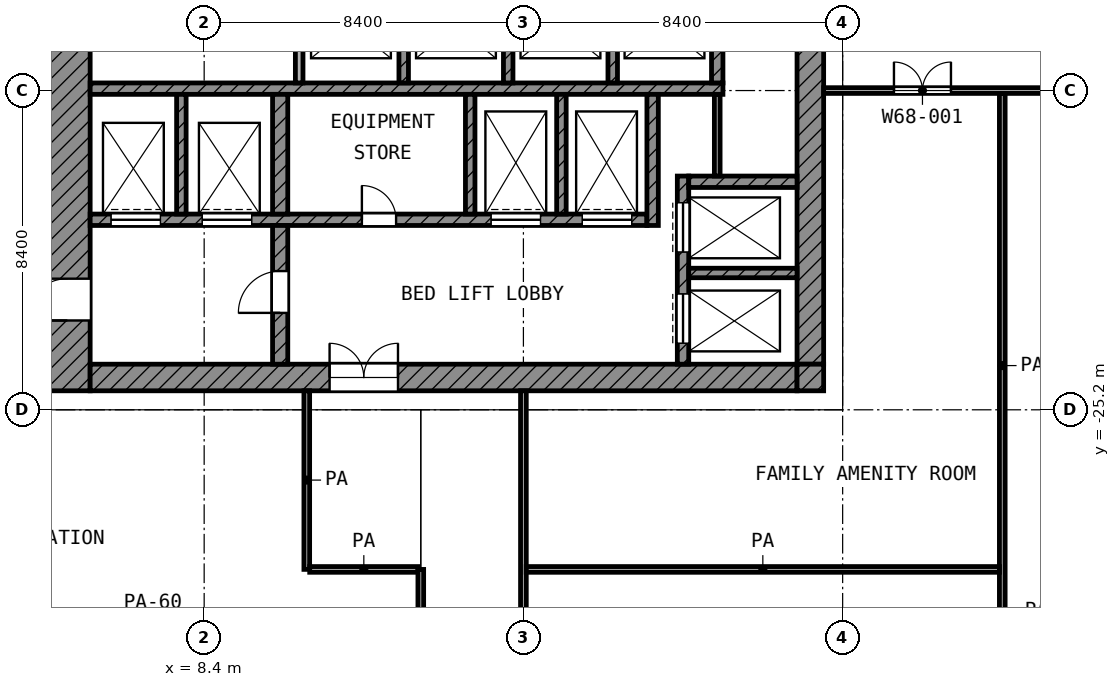
"""IFC4 building model, lengths in metres.
Left out: names, types, materials, properties, quantities, classifications, styles, units other than length and angle.
Written with IfcOpenShell. Run it as: python <this file> out.ifc"""

import sys

from ifc_helpers import new_model, si_unit, direction, frame, frame_2d, origin, place, context, subcontext, project, spatial, rectangle, extrude, element, fill, save


model = new_model("IFC4")
c1 = context("Model", 3, precision=1e-05, world=origin(), true_north=direction((0.0, 1.0)))
c2 = subcontext(c1, "Body", "Model", "MODEL_VIEW")
j1 = project(units=[si_unit("LENGTHUNIT", "METRE"), si_unit("PLANEANGLEUNIT", "RADIAN")], contexts=[c1])
p1 = place(None, origin())
s1 = spatial("IfcSite", under=j1, at=p1, CompositionType="ELEMENT")
p2 = place(p1, origin())
s2 = spatial("IfcBuilding", under=s1, at=p2, CompositionType="ELEMENT")
p3 = place(p2, frame((0.0, 0.0, 315.4)))
s3 = spatial("IfcBuildingStorey", under=s2, at=p3, CompositionType="ELEMENT", Elevation=315.4)
p4 = place(p3, frame((4.8, -24.7, 0.0), z_axis=(0.0, 0.0, 1.0), x_axis=(0.0, 1.0, 0.0)))
e1 = element("IfcWall", 1, at=p4, inside=s3, PredefinedType="SHEAR", context=c2, shape_type="SweptSolid", body=[
    extrude(rectangle(XDim=19.3, YDim=1.2, at=frame_2d((9.65, 0.0))), origin(), (0.0, 0.0, 1.0), 3.6),
])
p5 = place(p4, frame((11.15, 0.0, 0.0)))
e2 = element("IfcOpeningElement", 2, at=p5, cuts=e1, PredefinedType="OPENING", context=c2, shape_type="SweptSolid", body=[
    extrude(rectangle(XDim=1.1, YDim=2.1, at=frame_2d((0.55, 1.05))), frame((0.0, 0.61, 0.0), z_axis=(0.0, -1.0, 0.0), x_axis=(1.0, 0.0, 0.0)), (0.0, 0.0, 1.0), 1.22),
])
p6 = place(p4, frame((1.85, 0.0, 0.0)))
e3 = element("IfcOpeningElement", 3, at=p6, cuts=e1, PredefinedType="OPENING", context=c2, shape_type="SweptSolid", body=[
    extrude(rectangle(XDim=1.1, YDim=2.1, at=frame_2d((0.55, 1.05))), frame((0.0, 0.61, 0.0), z_axis=(0.0, -1.0, 0.0), x_axis=(1.0, 0.0, 0.0)), (0.0, 0.0, 1.0), 1.22),
])
p7 = place(p3, frame((24.35, -24.0, 0.0), z_axis=(0.0, 0.0, 1.0), x_axis=(0.0, 1.0, 0.0)))
e4 = element("IfcWall", 4, at=p7, inside=s3, PredefinedType="SHEAR", context=c2, shape_type="SweptSolid", body=[
    extrude(rectangle(XDim=18.6, YDim=0.7, at=frame_2d((9.3, 0.0))), origin(), (0.0, 0.0, 1.0), 3.6),
])
p8 = place(p7, frame((10.5, 0.0, 0.0)))
e5 = element("IfcOpeningElement", 5, at=p8, cuts=e4, PredefinedType="OPENING", context=c2, shape_type="SweptSolid", body=[
    extrude(rectangle(XDim=1.8, YDim=2.1, at=frame_2d((0.9, 1.05))), frame((0.0, 0.36, 0.0), z_axis=(0.0, -1.0, 0.0), x_axis=(1.0, 0.0, 0.0)), (0.0, 0.0, 1.0), 0.72),
])
p9 = place(p3, frame((5.4, -24.35, 0.0), z_axis=(0.0, 0.0, 1.0), x_axis=(1.0, 0.0, 0.0)))
e6 = element("IfcWall", 6, at=p9, inside=s3, PredefinedType="SHEAR", context=c2, shape_type="SweptSolid", body=[
    extrude(rectangle(XDim=18.6, YDim=0.7, at=frame_2d((9.3, 0.0))), origin(), (0.0, 0.0, 1.0), 3.6),
])
p10 = place(p9, frame((6.3, 0.0, 0.0)))
e7 = element("IfcOpeningElement", 7, at=p10, cuts=e6, PredefinedType="OPENING", context=c2, shape_type="SweptSolid", body=[
    extrude(rectangle(XDim=1.8, YDim=2.1, at=frame_2d((0.9, 1.05))), frame((0.0, 0.36, 0.0), z_axis=(0.0, -1.0, 0.0), x_axis=(1.0, 0.0, 0.0)), (0.0, 0.0, 1.0), 0.72),
])
p11 = place(p3, frame((24.35, -24.7, 0.0), z_axis=(0.0, 0.0, 1.0), x_axis=(0.0, 1.0, 0.0)))
e8 = element("IfcWall", 8, at=p11, inside=s3, PredefinedType="SHEAR", context=c2, shape_type="SweptSolid", body=[
    extrude(rectangle(XDim=0.7, YDim=0.7, at=frame_2d((0.35, 0.0))), origin(), (0.0, 0.0, 1.0), 3.6),
])
p12 = place(p3, frame((5.4, -16.75, 0.0), z_axis=(0.0, 0.0, 1.0), x_axis=(1.0, 0.0, 0.0)))
e9 = element("IfcWall", 9, at=p12, inside=s3, PredefinedType="SHEAR", context=c2, shape_type="SweptSolid", body=[
    extrude(rectangle(XDim=16.65, YDim=0.3, at=frame_2d((8.325, 0.0))), origin(), (0.0, 0.0, 1.0), 3.6),
])
p13 = place(p3, frame((5.4, -20.2, 0.0), z_axis=(0.0, 0.0, 1.0), x_axis=(1.0, 0.0, 0.0)))
e10 = element("IfcWall", 10, at=p13, inside=s3, PredefinedType="SHEAR", context=c2, shape_type="SweptSolid", body=[
    extrude(rectangle(XDim=14.65, YDim=0.3, at=frame_2d((7.325, 0.0))), origin(), (0.0, 0.0, 1.0), 3.6),
])
p14 = place(p13, frame((10.55, 0.0, 0.0)))
e11 = element("IfcOpeningElement", 11, at=p14, cuts=e10, PredefinedType="OPENING", context=c2, shape_type="SweptSolid", body=[
    extrude(rectangle(XDim=1.3, YDim=2.1, at=frame_2d((0.65, 1.05))), frame((0.0, 0.16, 0.0), z_axis=(0.0, -1.0, 0.0), x_axis=(1.0, 0.0, 0.0)), (0.0, 0.0, 1.0), 0.32),
])
p15 = place(p13, frame((12.95, 0.0, 0.0)))
e12 = element("IfcOpeningElement", 12, at=p15, cuts=e10, PredefinedType="OPENING", context=c2, shape_type="SweptSolid", body=[
    extrude(rectangle(XDim=1.3, YDim=2.1, at=frame_2d((0.65, 1.05))), frame((0.0, 0.16, 0.0), z_axis=(0.0, -1.0, 0.0), x_axis=(1.0, 0.0, 0.0)), (0.0, 0.0, 1.0), 0.32),
])
p16 = place(p13, frame((0.55, 0.0, 0.0)))
e13 = element("IfcOpeningElement", 13, at=p16, cuts=e10, PredefinedType="OPENING", context=c2, shape_type="SweptSolid", body=[
    extrude(rectangle(XDim=1.3, YDim=2.1, at=frame_2d((0.65, 1.05))), frame((0.0, 0.16, 0.0), z_axis=(0.0, -1.0, 0.0), x_axis=(1.0, 0.0, 0.0)), (0.0, 0.0, 1.0), 0.32),
])
p17 = place(p13, frame((2.95, 0.0, 0.0)))
e14 = element("IfcOpeningElement", 14, at=p17, cuts=e10, PredefinedType="OPENING", context=c2, shape_type="SweptSolid", body=[
    extrude(rectangle(XDim=1.3, YDim=2.1, at=frame_2d((0.65, 1.05))), frame((0.0, 0.16, 0.0), z_axis=(0.0, -1.0, 0.0), x_axis=(1.0, 0.0, 0.0)), (0.0, 0.0, 1.0), 0.32),
])
p18 = place(p13, frame((7.15, 0.0, 0.0)))
e15 = element("IfcOpeningElement", 15, at=p18, cuts=e10, PredefinedType="OPENING", context=c2, shape_type="SweptSolid", body=[
    extrude(rectangle(XDim=0.9, YDim=2.1, at=frame_2d((0.45, 1.05))), frame((0.0, 0.16, 0.0), z_axis=(0.0, -1.0, 0.0), x_axis=(1.0, 0.0, 0.0)), (0.0, 0.0, 1.0), 0.32),
])
p19 = place(p3, frame((10.4, -24.0, 0.0), z_axis=(0.0, 0.0, 1.0), x_axis=(0.0, 1.0, 0.0)))
e16 = element("IfcWall", 16, at=p19, inside=s3, PredefinedType="SHEAR", context=c2, shape_type="SweptSolid", body=[
    extrude(rectangle(XDim=3.65, YDim=0.4, at=frame_2d((1.825, 0.0))), origin(), (0.0, 0.0, 1.0), 3.6),
])
p20 = place(p19, frame((1.35, 0.0, 0.0)))
e17 = element("IfcOpeningElement", 17, at=p20, cuts=e16, PredefinedType="OPENING", context=c2, shape_type="SweptSolid", body=[
    extrude(rectangle(XDim=1.1, YDim=2.1, at=frame_2d((0.55, 1.05))), frame((0.0, 0.21, 0.0), z_axis=(0.0, -1.0, 0.0), x_axis=(1.0, 0.0, 0.0)), (0.0, 0.0, 1.0), 0.42),
])
p21 = place(p3, frame((10.4, -20.05, 0.0), z_axis=(0.0, 0.0, 1.0), x_axis=(0.0, 1.0, 0.0)))
e18 = element("IfcWall", 18, at=p21, inside=s3, PredefinedType="SHEAR", context=c2, shape_type="SweptSolid", body=[
    extrude(rectangle(XDim=3.15, YDim=0.4, at=frame_2d((1.575, 0.0))), origin(), (0.0, 0.0, 1.0), 3.6),
])
p22 = place(p3, frame((20.2, -20.35, 0.0), z_axis=(0.0, 0.0, 1.0), x_axis=(0.0, 1.0, 0.0)))
e19 = element("IfcWall", 19, at=p22, inside=s3, PredefinedType="SHEAR", context=c2, shape_type="SweptSolid", body=[
    extrude(rectangle(XDim=3.45, YDim=0.3, at=frame_2d((1.725, 0.0))), origin(), (0.0, 0.0, 1.0), 3.6),
])
p23 = place(p3, frame((21.9, -16.6, 0.0), z_axis=(0.0, 0.0, 1.0), x_axis=(0.0, 1.0, 0.0)))
e20 = element("IfcWall", 20, at=p23, inside=s3, PredefinedType="SHEAR", context=c2, shape_type="SweptSolid", body=[
    extrude(rectangle(XDim=2.35, YDim=0.3, at=frame_2d((1.175, 0.0))), origin(), (0.0, 0.0, 1.0), 3.6),
])
p24 = place(p3, frame((21.15, -19.2, 0.0), z_axis=(0.0, 0.0, 1.0), x_axis=(1.0, 0.0, 0.0)))
e21 = element("IfcWall", 21, at=p24, inside=s3, PredefinedType="SHEAR", context=c2, shape_type="SweptSolid", body=[
    extrude(rectangle(XDim=2.85, YDim=0.3, at=frame_2d((1.425, 0.0))), origin(), (0.0, 0.0, 1.0), 3.6),
])
p25 = place(p3, frame((21.0, -24.0, 0.0), z_axis=(0.0, 0.0, 1.0), x_axis=(0.0, 1.0, 0.0)))
e22 = element("IfcWall", 22, at=p25, inside=s3, PredefinedType="SHEAR", context=c2, shape_type="SweptSolid", body=[
    extrude(rectangle(XDim=4.95, YDim=0.3, at=frame_2d((2.475, 0.0))), origin(), (0.0, 0.0, 1.0), 3.6),
])
p26 = place(p25, frame((2.95, 0.0, 0.0)))
e23 = element("IfcOpeningElement", 23, at=p26, cuts=e22, PredefinedType="OPENING", context=c2, shape_type="SweptSolid", body=[
    extrude(rectangle(XDim=1.3, YDim=2.1, at=frame_2d((0.65, 1.05))), frame((0.0, 0.16, 0.0), z_axis=(0.0, -1.0, 0.0), x_axis=(1.0, 0.0, 0.0)), (0.0, 0.0, 1.0), 0.32),
])
p27 = place(p25, frame((0.55, 0.0, 0.0)))
e24 = element("IfcOpeningElement", 24, at=p27, cuts=e22, PredefinedType="OPENING", context=c2, shape_type="SweptSolid", body=[
    extrude(rectangle(XDim=1.3, YDim=2.1, at=frame_2d((0.65, 1.05))), frame((0.0, 0.16, 0.0), z_axis=(0.0, -1.0, 0.0), x_axis=(1.0, 0.0, 0.0)), (0.0, 0.0, 1.0), 0.32),
])
p28 = place(p3, frame((21.15, -21.6, 0.0), z_axis=(0.0, 0.0, 1.0), x_axis=(1.0, 0.0, 0.0)))
e25 = element("IfcWall", 25, at=p28, inside=s3, PredefinedType="SHEAR", context=c2, shape_type="SweptSolid", body=[
    extrude(rectangle(XDim=2.85, YDim=0.25, at=frame_2d((1.425, 0.0))), origin(), (0.0, 0.0, 1.0), 3.6),
])
for number, where, z_axis, x_axis in (
    (26, (7.8, -20.05, 0.0), (0.0, 0.0, 1.0), (0.0, 1.0, 0.0)),
    (27, (15.4, -20.05, 0.0), (0.0, 0.0, 1.0), (0.0, 1.0, 0.0)),
    (28, (17.8, -20.05, 0.0), (0.0, 0.0, 1.0), (0.0, 1.0, 0.0)),
):
    element("IfcWall", number, at=place(p3, frame(where, z_axis=z_axis, x_axis=x_axis)), inside=s3, PredefinedType="SHEAR", context=c2, shape_type="SweptSolid", body=[
        extrude(rectangle(XDim=3.15, YDim=0.25, at=frame_2d((1.575, 0.0))), origin(), (0.0, 0.0, 1.0), 3.6),
    ])
p29 = place(p3, frame((10.9, -16.6, 0.0), z_axis=(0.0, 0.0, 1.0), x_axis=(0.0, 1.0, 0.0)))
e29 = element("IfcWall", 29, at=p29, inside=s3, PredefinedType="PARTITIONING", context=c2, shape_type="SweptSolid", body=[
    extrude(rectangle(XDim=2.35, YDim=0.2, at=frame_2d((1.175, 0.0))), origin(), (0.0, 0.0, 1.0), 3.6),
])
for number, where, z_axis, x_axis in (
    (30, (13.65, -16.6, 0.0), (0.0, 0.0, 1.0), (0.0, 1.0, 0.0)),
    (31, (16.4, -16.6, 0.0), (0.0, 0.0, 1.0), (0.0, 1.0, 0.0)),
    (32, (19.15, -16.6, 0.0), (0.0, 0.0, 1.0), (0.0, 1.0, 0.0)),
):
    element("IfcWall", number, at=place(p3, frame(where, z_axis=z_axis, x_axis=x_axis)), inside=s3, PredefinedType="SHEAR", context=c2, shape_type="SweptSolid", body=[
        extrude(rectangle(XDim=2.35, YDim=0.25, at=frame_2d((1.175, 0.0))), origin(), (0.0, 0.0, 1.0), 3.6),
    ])
p30 = place(p3, frame((21.9, -19.05, 0.0), z_axis=(0.0, 0.0, 1.0), x_axis=(0.0, 1.0, 0.0)))
e33 = element("IfcWall", 33, at=p30, inside=s3, PredefinedType="PARTITIONING", context=c2, shape_type="SweptSolid", body=[
    extrude(rectangle(XDim=2.15, YDim=0.15, at=frame_2d((1.075, 0.0))), origin(), (0.0, 0.0, 1.0), 3.6),
])
p31 = place(p3, frame((11.177, -29.4, 0.0), z_axis=(0.0, 0.0, 1.0), x_axis=(1.0, 0.0, 0.0)))
e34 = element("IfcWall", 34, at=p31, inside=s3, PredefinedType="PARTITIONING", context=c2, shape_type="SweptSolid", body=[
    extrude(rectangle(XDim=2.848, YDim=0.15, at=frame_2d((1.424, 0.0))), origin(), (0.0, 0.0, 1.0), 3.6),
])
p32 = place(p3, frame((16.875, -29.4, 0.0), z_axis=(0.0, 0.0, 1.0), x_axis=(1.0, 0.0, 0.0)))
e35 = element("IfcWall", 35, at=p32, inside=s3, PredefinedType="PARTITIONING", context=c2, shape_type="SweptSolid", body=[
    extrude(rectangle(XDim=12.45, YDim=0.15, at=frame_2d((6.225, 0.0))), origin(), (0.0, 0.0, 1.0), 3.6),
])
p33 = place(p3, frame((24.7, -16.8, 0.0), z_axis=(0.0, 0.0, 1.0), x_axis=(1.0, 0.0, 0.0)))
e36 = element("IfcWall", 36, at=p33, inside=s3, PredefinedType="PARTITIONING", context=c2, shape_type="SweptSolid", body=[
    extrude(rectangle(XDim=34.02, YDim=0.15, at=frame_2d((17.01, 0.0))), origin(), (0.0, 0.0, 1.0), 3.6),
])
p34 = place(p33, frame((1.85, 0.0, 0.0)))
e37 = element("IfcOpeningElement", 37, at=p34, cuts=e36, PredefinedType="OPENING", context=c2, shape_type="SweptSolid", body=[
    extrude(rectangle(XDim=1.5, YDim=2.1, at=frame_2d((0.75, 1.05))), frame((0.0, 0.085, 0.0), z_axis=(0.0, -1.0, 0.0), x_axis=(1.0, 0.0, 0.0)), (0.0, 0.0, 1.0), 0.17),
])
p35 = place(p33, frame((9.4, 0.0, 0.0)))
e38 = element("IfcOpeningElement", 38, at=p35, cuts=e36, PredefinedType="OPENING", context=c2, shape_type="SweptSolid", body=[
    extrude(rectangle(XDim=1.2, YDim=2.1, at=frame_2d((0.6, 1.05))), frame((0.0, 0.085, 0.0), z_axis=(0.0, -1.0, 0.0), x_axis=(1.0, 0.0, 0.0)), (0.0, 0.0, 1.0), 0.17),
])
p36 = place(p33, frame((19.8, 0.0, 0.0)))
e39 = element("IfcOpeningElement", 39, at=p36, cuts=e36, PredefinedType="OPENING", context=c2, shape_type="SweptSolid", body=[
    extrude(rectangle(XDim=1.2, YDim=2.1, at=frame_2d((0.6, 1.05))), frame((0.0, 0.085, 0.0), z_axis=(0.0, -1.0, 0.0), x_axis=(1.0, 0.0, 0.0)), (0.0, 0.0, 1.0), 0.17),
])
p37 = place(p33, frame((18.28, 0.0, 0.0)))
e40 = element("IfcOpeningElement", 40, at=p37, cuts=e36, PredefinedType="OPENING", context=c2, shape_type="SweptSolid", body=[
    extrude(rectangle(XDim=1.2, YDim=2.1, at=frame_2d((0.6, 1.05))), frame((0.0, 0.085, 0.0), z_axis=(0.0, -1.0, 0.0), x_axis=(1.0, 0.0, 0.0)), (0.0, 0.0, 1.0), 0.17),
])
p38 = place(p33, frame((24.0, 0.0, 0.0)))
e41 = element("IfcOpeningElement", 41, at=p38, cuts=e36, PredefinedType="OPENING", context=c2, shape_type="SweptSolid", body=[
    extrude(rectangle(XDim=1.2, YDim=2.1, at=frame_2d((0.6, 1.05))), frame((0.0, 0.085, 0.0), z_axis=(0.0, -1.0, 0.0), x_axis=(1.0, 0.0, 0.0)), (0.0, 0.0, 1.0), 0.17),
])
p39 = place(p33, frame((27.45, 0.0, 0.0)))
e42 = element("IfcOpeningElement", 42, at=p39, cuts=e36, PredefinedType="OPENING", context=c2, shape_type="SweptSolid", body=[
    extrude(rectangle(XDim=1.0, YDim=2.1, at=frame_2d((0.5, 1.05))), frame((0.0, 0.085, 0.0), z_axis=(0.0, -1.0, 0.0), x_axis=(1.0, 0.0, 0.0)), (0.0, 0.0, 1.0), 0.17),
])
p40 = place(p33, frame((31.65, 0.0, 0.0)))
e43 = element("IfcOpeningElement", 43, at=p40, cuts=e36, PredefinedType="OPENING", context=c2, shape_type="SweptSolid", body=[
    extrude(rectangle(XDim=1.0, YDim=2.1, at=frame_2d((0.5, 1.05))), frame((0.0, 0.085, 0.0), z_axis=(0.0, -1.0, 0.0), x_axis=(1.0, 0.0, 0.0)), (0.0, 0.0, 1.0), 0.17),
])
p41 = place(p3, frame((11.1, -29.399, 0.0), z_axis=(0.0, 0.0, 1.0), x_axis=(0.0, 1.0, 0.0)))
e44 = element("IfcWall", 44, at=p41, inside=s3, PredefinedType="PARTITIONING", context=c2, shape_type="SweptSolid", body=[
    extrude(rectangle(XDim=4.699, YDim=0.15, at=frame_2d((2.35, 0.0))), origin(), (0.0, 0.0, 1.0), 3.6),
])
p42 = place(p3, frame((14.1, -31.957, 0.0), z_axis=(0.0, 0.0, 1.0), x_axis=(0.0, 1.0, 0.0)))
e45 = element("IfcWall", 45, at=p42, inside=s3, PredefinedType="PARTITIONING", context=c2, shape_type="SweptSolid", body=[
    extrude(rectangle(XDim=2.557, YDim=0.15, at=frame_2d((1.279, 0.0))), origin(), (0.0, 0.0, 1.0), 3.6),
])
p43 = place(p3, frame((16.8, -41.92, 0.0), z_axis=(0.0, 0.0, 1.0), x_axis=(0.0, 1.0, 0.0)))
e46 = element("IfcWall", 46, at=p43, inside=s3, PredefinedType="PARTITIONING", context=c2, shape_type="SweptSolid", body=[
    extrude(rectangle(XDim=17.22, YDim=0.15, at=frame_2d((8.61, 0.0))), origin(), (0.0, 0.0, 1.0), 3.6),
])
p44 = place(p43, frame((6.62, 0.0, 0.0)))
e47 = element("IfcOpeningElement", 47, at=p44, cuts=e46, PredefinedType="OPENING", context=c2, shape_type="SweptSolid", body=[
    extrude(rectangle(XDim=1.2, YDim=2.1, at=frame_2d((0.6, 1.05))), frame((0.0, 0.085, 0.0), z_axis=(0.0, -1.0, 0.0), x_axis=(1.0, 0.0, 0.0)), (0.0, 0.0, 1.0), 0.17),
])
p45 = place(p43, frame((1.22, 0.0, 0.0)))
e48 = element("IfcOpeningElement", 48, at=p45, cuts=e46, PredefinedType="OPENING", context=c2, shape_type="SweptSolid", body=[
    extrude(rectangle(XDim=1.0, YDim=2.1, at=frame_2d((0.5, 1.05))), frame((0.0, 0.085, 0.0), z_axis=(0.0, -1.0, 0.0), x_axis=(1.0, 0.0, 0.0)), (0.0, 0.0, 1.0), 0.17),
])
p46 = place(p3, frame((29.4, -31.198, 0.0), z_axis=(0.0, 0.0, 1.0), x_axis=(0.0, 1.0, 0.0)))
e49 = element("IfcWall", 49, at=p46, inside=s3, PredefinedType="PARTITIONING", context=c2, shape_type="SweptSolid", body=[
    extrude(rectangle(XDim=14.323, YDim=0.15, at=frame_2d((7.162, 0.0))), origin(), (0.0, 0.0, 1.0), 3.6),
])
p47 = place(p26, origin())
e50 = element("IfcDoor", 50, at=p47, inside=s3, OperationType="DOUBLE_DOOR_SLIDING", PredefinedType="DOOR", context=c2, shape_type="SweptSolid", body=[
    extrude(rectangle(XDim=1.3, YDim=2.1, at=frame_2d((0.65, 1.05))), frame((0.0, 0.025, 0.0), z_axis=(0.0, -1.0, 0.0), x_axis=(1.0, 0.0, 0.0)), (0.0, 0.0, 1.0), 0.05),
])
fill(e23, e50)
p48 = place(p27, origin())
e51 = element("IfcDoor", 51, at=p48, inside=s3, OperationType="DOUBLE_DOOR_SLIDING", PredefinedType="DOOR", context=c2, shape_type="SweptSolid", body=[
    extrude(rectangle(XDim=1.3, YDim=2.1, at=frame_2d((0.65, 1.05))), frame((0.0, 0.025, 0.0), z_axis=(0.0, -1.0, 0.0), x_axis=(1.0, 0.0, 0.0)), (0.0, 0.0, 1.0), 0.05),
])
fill(e24, e51)
p49 = place(p14, origin())
e52 = element("IfcDoor", 52, at=p49, inside=s3, OperationType="DOUBLE_DOOR_SLIDING", PredefinedType="DOOR", context=c2, shape_type="SweptSolid", body=[
    extrude(rectangle(XDim=1.3, YDim=2.1, at=frame_2d((0.65, 1.05))), frame((0.0, 0.025, 0.0), z_axis=(0.0, -1.0, 0.0), x_axis=(1.0, 0.0, 0.0)), (0.0, 0.0, 1.0), 0.05),
])
fill(e11, e52)
p50 = place(p15, origin())
e53 = element("IfcDoor", 53, at=p50, inside=s3, OperationType="DOUBLE_DOOR_SLIDING", PredefinedType="DOOR", context=c2, shape_type="SweptSolid", body=[
    extrude(rectangle(XDim=1.3, YDim=2.1, at=frame_2d((0.65, 1.05))), frame((0.0, 0.025, 0.0), z_axis=(0.0, -1.0, 0.0), x_axis=(1.0, 0.0, 0.0)), (0.0, 0.0, 1.0), 0.05),
])
fill(e12, e53)
p51 = place(p16, origin())
e54 = element("IfcDoor", 54, at=p51, inside=s3, OperationType="DOUBLE_DOOR_SLIDING", PredefinedType="DOOR", context=c2, shape_type="SweptSolid", body=[
    extrude(rectangle(XDim=1.3, YDim=2.1, at=frame_2d((0.65, 1.05))), frame((0.0, 0.025, 0.0), z_axis=(0.0, -1.0, 0.0), x_axis=(1.0, 0.0, 0.0)), (0.0, 0.0, 1.0), 0.05),
])
fill(e13, e54)
p52 = place(p17, origin())
e55 = element("IfcDoor", 55, at=p52, inside=s3, OperationType="DOUBLE_DOOR_SLIDING", PredefinedType="DOOR", context=c2, shape_type="SweptSolid", body=[
    extrude(rectangle(XDim=1.3, YDim=2.1, at=frame_2d((0.65, 1.05))), frame((0.0, 0.025, 0.0), z_axis=(0.0, -1.0, 0.0), x_axis=(1.0, 0.0, 0.0)), (0.0, 0.0, 1.0), 0.05),
])
fill(e14, e55)
p53 = place(p6, origin())
e56 = element("IfcDoor", 56, at=p53, inside=s3, OperationType="SINGLE_SWING_LEFT", PredefinedType="DOOR", context=c2, shape_type="SweptSolid", body=[
    extrude(rectangle(XDim=1.1, YDim=2.1, at=frame_2d((0.55, 1.05))), frame((0.0, 0.025, 0.0), z_axis=(0.0, -1.0, 0.0), x_axis=(1.0, 0.0, 0.0)), (0.0, 0.0, 1.0), 0.05),
])
fill(e3, e56)
p54 = place(p20, origin())
e57 = element("IfcDoor", 57, at=p54, inside=s3, OperationType="SINGLE_SWING_LEFT", PredefinedType="DOOR", context=c2, shape_type="SweptSolid", body=[
    extrude(rectangle(XDim=1.1, YDim=2.1, at=frame_2d((0.55, 1.05))), frame((0.0, 0.025, 0.0), z_axis=(0.0, -1.0, 0.0), x_axis=(1.0, 0.0, 0.0)), (0.0, 0.0, 1.0), 0.05),
])
fill(e17, e57)
p55 = place(p10, origin())
e58 = element("IfcDoor", 58, at=p55, inside=s3, OperationType="DOUBLE_DOOR_SINGLE_SWING", PredefinedType="DOOR", context=c2, shape_type="SweptSolid", body=[
    extrude(rectangle(XDim=1.8, YDim=2.1, at=frame_2d((0.9, 1.05))), frame((0.0, 0.025, 0.0), z_axis=(0.0, -1.0, 0.0), x_axis=(1.0, 0.0, 0.0)), (0.0, 0.0, 1.0), 0.05),
])
fill(e7, e58)
p56 = place(p18, origin())
e59 = element("IfcDoor", 59, at=p56, inside=s3, OperationType="SINGLE_SWING_LEFT", PredefinedType="DOOR", context=c2, shape_type="SweptSolid", body=[
    extrude(rectangle(XDim=0.9, YDim=2.1, at=frame_2d((0.45, 1.05))), frame((0.0, 0.025, 0.0), z_axis=(0.0, -1.0, 0.0), x_axis=(1.0, 0.0, 0.0)), (0.0, 0.0, 1.0), 0.05),
])
fill(e15, e59)
p57 = place(p34, origin())
e60 = element("IfcDoor", 60, at=p57, inside=s3, OperationType="DOUBLE_DOOR_SINGLE_SWING", PredefinedType="DOOR", context=c2, shape_type="SweptSolid", body=[
    extrude(rectangle(XDim=1.5, YDim=2.1, at=frame_2d((0.75, 1.05))), frame((0.0, 0.025, 0.0), z_axis=(0.0, -1.0, 0.0), x_axis=(1.0, 0.0, 0.0)), (0.0, 0.0, 1.0), 0.05),
])
fill(e37, e60)
save(model, sys.argv[1])
